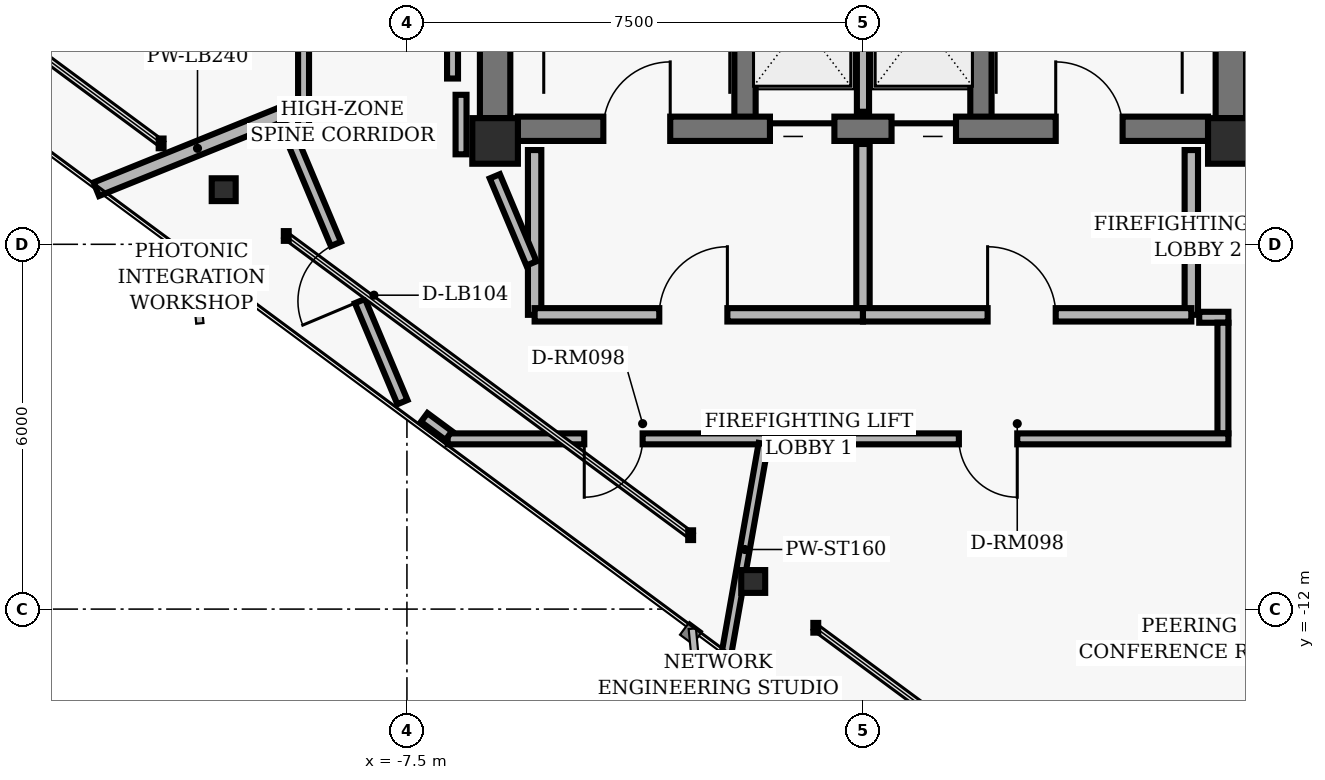
"""IFC4 building model, lengths in metres.
Left out: names, types, materials, properties, quantities, classifications, styles, units other than length and angle.
Written with IfcOpenShell. Run it as: python <this file> out.ifc"""

import sys

from ifc_helpers import new_model, si_unit, direction, frame, frame_2d, origin, origin_2d, place, context, subcontext, project, spatial, rectangle, hollow_rectangle, i_section, extrude, element, fill, save


model = new_model("IFC4")
c1 = context("Model", 3, precision=1e-05, world=origin(), true_north=direction((0.0, 1.0)))
c2 = subcontext(c1, "Body", "Model", "MODEL_VIEW")
j1 = project(units=[si_unit("LENGTHUNIT", "METRE"), si_unit("PLANEANGLEUNIT", "RADIAN")], contexts=[c1])
p1 = place(None, origin())
s1 = spatial("IfcSite", under=j1, at=p1, CompositionType="ELEMENT")
p2 = place(p1, origin())
s2 = spatial("IfcBuilding", under=s1, at=p2, CompositionType="ELEMENT")
p3 = place(p2, frame((0.0, 0.0, 217.92)))
s3 = spatial("IfcBuildingStorey", under=s2, at=p3, CompositionType="ELEMENT", Elevation=217.92)
for number, where, z_axis, x_axis in (
    (1, (-6.05, -4.3, 0.0), (0.0, 0.0, 1.0), (1.0, 0.0, 0.0)),
    (2, (6.05, -4.3, 0.0), (0.0, 0.0, 1.0), (1.0, 0.0, 0.0)),
):
    element("IfcColumn", number, at=place(p3, frame(where, z_axis=z_axis, x_axis=x_axis)), inside=s3, PredefinedType="COLUMN", context=c2, shape_type="SweptSolid", body=[
        extrude(hollow_rectangle(XDim=0.75, YDim=0.75, WallThickness=0.05, InnerFilletRadius=0.02, OuterFilletRadius=0.04, at=origin_2d()), origin(), (0.0, 0.0, 1.0), 3.04),
    ])
for number, where, z_axis, x_axis in (
    (3, (-6.05, -3.925, 0.0), (0.0, 0.0, 1.0), (0.0, 1.0, 0.0)),
    (4, (6.05, -3.925, 0.0), (0.0, 0.0, 1.0), (0.0, 1.0, 0.0)),
):
    element("IfcWall", number, at=place(p3, frame(where, z_axis=z_axis, x_axis=x_axis)), inside=s3, PredefinedType="SHEAR", context=c2, shape_type="SweptSolid", body=[
        extrude(rectangle(XDim=3.55, YDim=0.5, at=frame_2d((1.775, 0.0))), origin(), (0.0, 0.0, 1.0), 2.798),
    ])
for number, where, z_axis, x_axis in (
    (5, (-1.94, -4.1, 0.0), (0.0, 0.0, 1.0), (0.0, 1.0, 0.0)),
    (6, (1.94, -4.1, 0.0), (0.0, 0.0, 1.0), (0.0, 1.0, 0.0)),
):
    element("IfcWall", number, at=place(p3, frame(where, z_axis=z_axis, x_axis=x_axis)), inside=s3, PredefinedType="SHEAR", context=c2, shape_type="SweptSolid", body=[
        extrude(rectangle(XDim=8.2, YDim=0.35, at=frame_2d((4.1, 0.0))), origin(), (0.0, 0.0, 1.0), 2.798),
    ])
p4 = place(p3, frame((-5.675, -4.1, 0.0), z_axis=(0.0, 0.0, 1.0), x_axis=(1.0, 0.0, 0.0)))
e7 = element("IfcWall", 7, at=p4, inside=s3, PredefinedType="SHEAR", context=c2, shape_type="SweptSolid", body=[
    extrude(rectangle(XDim=11.35, YDim=0.4, at=frame_2d((5.675, 0.0))), origin(), (0.0, 0.0, 1.0), 2.798),
])
p5 = place(p4, frame((1.405, 0.0, 0.0)))
e8 = element("IfcOpeningElement", 8, at=p5, cuts=e7, PredefinedType="OPENING", context=c2, shape_type="SweptSolid", body=[
    extrude(rectangle(XDim=1.1, YDim=2.04, at=frame_2d((0.55, 1.02))), frame((0.0, 0.21, 0.0), z_axis=(0.0, -1.0, 0.0), x_axis=(1.0, 0.0, 0.0)), (0.0, 0.0, 1.0), 0.42),
])
p6 = place(p4, frame((8.845, 0.0, 0.0)))
e9 = element("IfcOpeningElement", 9, at=p6, cuts=e7, PredefinedType="OPENING", context=c2, shape_type="SweptSolid", body=[
    extrude(rectangle(XDim=1.1, YDim=2.04, at=frame_2d((0.55, 1.02))), frame((0.0, 0.21, 0.0), z_axis=(0.0, -1.0, 0.0), x_axis=(1.0, 0.0, 0.0)), (0.0, 0.0, 1.0), 0.42),
])
p7 = place(p4, frame((4.145, 0.0, 0.0)))
e10 = element("IfcOpeningElement", 10, at=p7, cuts=e7, PredefinedType="OPENING", context=c2, shape_type="SweptSolid", body=[
    extrude(rectangle(XDim=1.06, YDim=2.04, at=frame_2d((0.53, 1.02))), frame((0.0, 0.21, 0.0), z_axis=(0.0, -1.0, 0.0), x_axis=(1.0, 0.0, 0.0)), (0.0, 0.0, 1.0), 0.42),
])
p8 = place(p4, frame((6.145, 0.0, 0.0)))
e11 = element("IfcOpeningElement", 11, at=p8, cuts=e7, PredefinedType="OPENING", context=c2, shape_type="SweptSolid", body=[
    extrude(rectangle(XDim=1.06, YDim=2.04, at=frame_2d((0.53, 1.02))), frame((0.0, 0.21, 0.0), z_axis=(0.0, -1.0, 0.0), x_axis=(1.0, 0.0, 0.0)), (0.0, 0.0, 1.0), 0.42),
])
for number, where, z_axis, x_axis in (
    (12, (-10.513, -5.102, 0.0), (0.0, 0.0, 1.0), (1.0, 0.0, 0.0)),
    (13, (-1.805, -11.546, 0.0), (0.0, 0.0, 1.0), (1.0, 0.0, 0.0)),
):
    element("IfcColumn", number, at=place(p3, frame(where, z_axis=z_axis, x_axis=x_axis)), inside=s3, PredefinedType="COLUMN", context=c2, shape_type="SweptSolid", body=[
        extrude(i_section(OverallWidth=0.394, OverallDepth=0.375, WebThickness=0.017, FlangeThickness=0.028, FilletRadius=0.016, at=origin_2d()), origin(), (0.0, 0.0, 1.0), 3.04),
    ])
p9 = place(p3, frame((0.0, -3.82, 0.0), z_axis=(0.0, 0.0, 1.0), x_axis=(0.0, 1.0, 0.0)))
e14 = element("IfcWall", 14, at=p9, inside=s3, PredefinedType="PARTITIONING", context=c2, shape_type="SweptSolid", body=[
    extrude(rectangle(XDim=2.67, YDim=0.2, at=frame_2d((1.335, 0.0))), origin(), (0.0, 0.0, 1.0), 2.773),
])
for number, where, z_axis, x_axis in (
    (15, (-5.4, -7.16, 0.0), (0.0, 0.0, 1.0), (0.0, 1.0, 0.0)),
    (16, (5.4, -7.16, 0.0), (0.0, 0.0, 1.0), (0.0, 1.0, 0.0)),
):
    element("IfcWall", number, at=place(p3, frame(where, z_axis=z_axis, x_axis=x_axis)), inside=s3, PredefinedType="PARTITIONING", context=c2, shape_type="SweptSolid", body=[
        extrude(rectangle(XDim=2.71, YDim=0.22, at=frame_2d((1.355, 0.0))), origin(), (0.0, 0.0, 1.0), 2.773),
    ])
p10 = place(p3, frame((0.0, -7.16, 0.0), z_axis=(0.0, 0.0, 1.0), x_axis=(0.0, 1.0, 0.0)))
e17 = element("IfcWall", 17, at=p10, inside=s3, PredefinedType="PARTITIONING", context=c2, shape_type="SweptSolid", body=[
    extrude(rectangle(XDim=2.81, YDim=0.22, at=frame_2d((1.405, 0.0))), origin(), (0.0, 0.0, 1.0), 2.773),
])
p11 = place(p3, frame((-5.4, -7.16, 0.0), z_axis=(0.0, 0.0, 1.0), x_axis=(1.0, 0.0, 0.0)))
e18 = element("IfcWall", 18, at=p11, inside=s3, PredefinedType="PARTITIONING", context=c2, shape_type="SweptSolid", body=[
    extrude(rectangle(XDim=5.4, YDim=0.22, at=frame_2d((2.7, 0.0))), origin(), (0.0, 0.0, 1.0), 2.395),
])
p12 = place(p11, frame((2.05, 0.0, 0.0)))
e19 = element("IfcOpeningElement", 19, at=p12, cuts=e18, PredefinedType="OPENING", context=c2, shape_type="SweptSolid", body=[
    extrude(rectangle(XDim=1.12, YDim=2.02, at=frame_2d((0.56, 1.01))), frame((0.0, 0.12, 0.0), z_axis=(0.0, -1.0, 0.0), x_axis=(1.0, 0.0, 0.0)), (0.0, 0.0, 1.0), 0.24),
])
p13 = place(p3, frame((0.0, -7.16, 0.0), z_axis=(0.0, 0.0, 1.0), x_axis=(1.0, 0.0, 0.0)))
e20 = element("IfcWall", 20, at=p13, inside=s3, PredefinedType="PARTITIONING", context=c2, shape_type="SweptSolid", body=[
    extrude(rectangle(XDim=5.4, YDim=0.22, at=frame_2d((2.7, 0.0))), origin(), (0.0, 0.0, 1.0), 2.773),
])
p14 = place(p13, frame((2.05, 0.0, 0.0)))
e21 = element("IfcOpeningElement", 21, at=p14, cuts=e20, PredefinedType="OPENING", context=c2, shape_type="SweptSolid", body=[
    extrude(rectangle(XDim=1.12, YDim=2.02, at=frame_2d((0.56, 1.01))), frame((0.0, 0.12, 0.0), z_axis=(0.0, -1.0, 0.0), x_axis=(1.0, 0.0, 0.0)), (0.0, 0.0, 1.0), 0.24),
])
p15 = place(p3, frame((-7.574, -8.596, 0.0), z_axis=(0.0, 0.0, 1.0), x_axis=(-0.38757793583, 0.921836939842, 0.0)))
e22 = element("IfcWall", 22, at=p15, inside=s3, PredefinedType="PARTITIONING", context=c2, shape_type="SweptSolid", body=[
    extrude(rectangle(XDim=4.625, YDim=0.18, at=frame_2d((2.313, 0.0))), origin(), (0.0, 0.0, 1.0), 2.773),
])
p16 = place(p15, frame((1.803, 0.0, 0.0)))
e23 = element("IfcOpeningElement", 23, at=p16, cuts=e22, PredefinedType="OPENING", context=c2, shape_type="SweptSolid", body=[
    extrude(rectangle(XDim=1.02, YDim=2.02, at=frame_2d((0.51, 1.01))), frame((0.0, 0.1, 0.0), z_axis=(0.0, -1.0, 0.0), x_axis=(1.0, 0.0, 0.0)), (0.0, 0.0, 1.0), 0.2),
])
p17 = place(p3, frame((-9.2, -4.303, 0.0), z_axis=(0.0, 0.0, 1.0), x_axis=(0.0, 1.0, 0.0)))
e24 = element("IfcWall", 24, at=p17, inside=s3, PredefinedType="PARTITIONING", context=c2, shape_type="SweptSolid", body=[
    extrude(rectangle(XDim=8.607, YDim=0.18, at=frame_2d((4.303, 0.0))), origin(), (0.0, 0.0, 1.0), 2.773),
])
p18 = place(p17, frame((2.767, 0.0, 0.0)))
e25 = element("IfcOpeningElement", 25, at=p18, cuts=e24, PredefinedType="OPENING", context=c2, shape_type="SweptSolid", body=[
    extrude(rectangle(XDim=0.96, YDim=2.02, at=frame_2d((0.48, 1.01))), frame((0.0, 0.1, 0.0), z_axis=(0.0, -1.0, 0.0), x_axis=(1.0, 0.0, 0.0)), (0.0, 0.0, 1.0), 0.2),
])
p19 = place(p3, frame((-6.75, 3.273, 0.0), z_axis=(0.0, 0.0, 1.0), x_axis=(0.0, -1.0, 0.0)))
e26 = element("IfcWall", 26, at=p19, inside=s3, PredefinedType="PARTITIONING", context=c2, shape_type="SweptSolid", body=[
    extrude(rectangle(XDim=6.547, YDim=0.18, at=frame_2d((3.273, 0.0))), origin(), (0.0, 0.0, 1.0), 2.773),
])
p20 = place(p3, frame((-6.61, -3.541, 0.0), z_axis=(0.0, 0.0, 1.0), x_axis=(0.0, -1.0, 0.0)))
e27 = element("IfcWall", 27, at=p20, inside=s3, PredefinedType="PARTITIONING", context=c2, shape_type="SweptSolid", body=[
    extrude(rectangle(XDim=0.979, YDim=0.18, at=frame_2d((0.489, 0.0))), origin(), (0.0, 0.0, 1.0), 2.773),
])
p21 = place(p3, frame((-6.055, -4.882, 0.0), z_axis=(0.0, 0.0, 1.0), x_axis=(0.387579540458, -0.921836265189, 0.0)))
e28 = element("IfcWall", 28, at=p21, inside=s3, PredefinedType="PARTITIONING", context=c2, shape_type="SweptSolid", body=[
    extrude(rectangle(XDim=1.555, YDim=0.18, at=frame_2d((0.777, 0.0))), origin(), (0.0, 0.0, 1.0), 2.253),
])
p22 = place(p3, frame((5.53, -7.2, 0.0), z_axis=(0.0, 0.0, 1.0), x_axis=(1.0, 0.0, 0.0)))
e29 = element("IfcWall", 29, at=p22, inside=s3, PredefinedType="PARTITIONING", context=c2, shape_type="SweptSolid", body=[
    extrude(rectangle(XDim=0.48, YDim=0.18, at=frame_2d((0.24, 0.0))), origin(), (0.0, 0.0, 1.0), 2.773),
])
p23 = place(p3, frame((5.92, -7.29, 0.0), z_axis=(0.0, 0.0, 1.0), x_axis=(0.0, -1.0, 0.0)))
e30 = element("IfcWall", 30, at=p23, inside=s3, PredefinedType="PARTITIONING", context=c2, shape_type="SweptSolid", body=[
    extrude(rectangle(XDim=1.82, YDim=0.18, at=frame_2d((0.91, 0.0))), origin(), (0.0, 0.0, 1.0), 2.253),
])
p24 = place(p3, frame((6.01, -9.2, 0.0), z_axis=(0.0, 0.0, 1.0), x_axis=(-1.0, 0.0, 0.0)))
e31 = element("IfcWall", 31, at=p24, inside=s3, PredefinedType="PARTITIONING", context=c2, shape_type="SweptSolid", body=[
    extrude(rectangle(XDim=12.84, YDim=0.18, at=frame_2d((6.42, 0.0))), origin(), (0.0, 0.0, 1.0), 2.773),
])
p25 = place(p24, frame((9.634, 0.0, 0.0)))
e32 = element("IfcOpeningElement", 32, at=p25, cuts=e31, PredefinedType="OPENING", context=c2, shape_type="SweptSolid", body=[
    extrude(rectangle(XDim=0.96, YDim=2.02, at=frame_2d((0.48, 1.01))), frame((0.0, 0.1, 0.0), z_axis=(0.0, -1.0, 0.0), x_axis=(1.0, 0.0, 0.0)), (0.0, 0.0, 1.0), 0.2),
])
p26 = place(p24, frame((3.473, 0.0, 0.0)))
e33 = element("IfcOpeningElement", 33, at=p26, cuts=e31, PredefinedType="OPENING", context=c2, shape_type="SweptSolid", body=[
    extrude(rectangle(XDim=0.96, YDim=2.02, at=frame_2d((0.48, 1.01))), frame((0.0, 0.1, 0.0), z_axis=(0.0, -1.0, 0.0), x_axis=(1.0, 0.0, 0.0)), (0.0, 0.0, 1.0), 0.2),
])
p27 = place(p3, frame((-6.812, -9.146, 0.0), z_axis=(0.0, 0.0, 1.0), x_axis=(-0.803893055119, 0.594773869577, 0.0)))
e34 = element("IfcWall", 34, at=p27, inside=s3, PredefinedType="PARTITIONING", context=c2, shape_type="SweptSolid", body=[
    extrude(rectangle(XDim=0.502, YDim=0.18, at=frame_2d((0.251, 0.0))), origin(), (0.0, 0.0, 1.0), 2.773),
])
p28 = place(p3, frame((-9.28, -3.75, 0.0), z_axis=(0.0, 0.0, 1.0), x_axis=(-0.927209590074, -0.374542889499, 0.0)))
e35 = element("IfcWall", 35, at=p28, inside=s3, PredefinedType="PARTITIONING", context=c2, shape_type="SweptSolid", body=[
    extrude(rectangle(XDim=3.59, YDim=0.24, at=frame_2d((1.795, 0.0))), origin(), (0.0, 0.0, 1.0), 2.773),
])
p29 = place(p3, frame((-1.636, -9.28, 0.0), z_axis=(0.0, 0.0, 1.0), x_axis=(-0.17367100135, -0.984803728308, 0.0)))
e36 = element("IfcWall", 36, at=p29, inside=s3, PredefinedType="PARTITIONING", context=c2, shape_type="SweptSolid", body=[
    extrude(rectangle(XDim=3.533, YDim=0.16, at=frame_2d((1.766, 0.0))), origin(), (0.0, 0.0, 1.0), 2.773),
])
p30 = place(p5, origin())
e37 = element("IfcDoor", 37, at=p30, inside=s3, OperationType="SINGLE_SWING_RIGHT", PredefinedType="DOOR", context=c2, shape_type="SweptSolid", body=[
    extrude(rectangle(XDim=1.1, YDim=2.04, at=frame_2d((0.55, 1.02))), frame((0.0, 0.025, 0.0), z_axis=(0.0, -1.0, 0.0), x_axis=(1.0, 0.0, 0.0)), (0.0, 0.0, 1.0), 0.05),
])
fill(e8, e37)
p31 = place(p6, origin())
e38 = element("IfcDoor", 38, at=p31, inside=s3, OperationType="SINGLE_SWING_LEFT", PredefinedType="DOOR", context=c2, shape_type="SweptSolid", body=[
    extrude(rectangle(XDim=1.1, YDim=2.04, at=frame_2d((0.55, 1.02))), frame((0.0, 0.025, 0.0), z_axis=(0.0, -1.0, 0.0), x_axis=(1.0, 0.0, 0.0)), (0.0, 0.0, 1.0), 0.05),
])
fill(e9, e38)
p32 = place(p7, origin())
e39 = element("IfcDoor", 39, at=p32, inside=s3, OperationType="SLIDING_TO_LEFT", PredefinedType="DOOR", context=c2, shape_type="SweptSolid", body=[
    extrude(rectangle(XDim=1.06, YDim=2.04, at=frame_2d((0.53, 1.02))), frame((0.0, 0.025, 0.0), z_axis=(0.0, -1.0, 0.0), x_axis=(1.0, 0.0, 0.0)), (0.0, 0.0, 1.0), 0.05),
])
fill(e10, e39)
p33 = place(p8, origin())
e40 = element("IfcDoor", 40, at=p33, inside=s3, OperationType="SLIDING_TO_RIGHT", PredefinedType="DOOR", context=c2, shape_type="SweptSolid", body=[
    extrude(rectangle(XDim=1.06, YDim=2.04, at=frame_2d((0.53, 1.02))), frame((0.0, 0.025, 0.0), z_axis=(0.0, -1.0, 0.0), x_axis=(1.0, 0.0, 0.0)), (0.0, 0.0, 1.0), 0.05),
])
fill(e11, e40)
p34 = place(p12, origin())
e41 = element("IfcDoor", 41, at=p34, inside=s3, OperationType="SINGLE_SWING_RIGHT", PredefinedType="DOOR", context=c2, shape_type="SweptSolid", body=[
    extrude(rectangle(XDim=1.12, YDim=2.02, at=frame_2d((0.56, 1.01))), frame((0.0, 0.025, 0.0), z_axis=(0.0, -1.0, 0.0), x_axis=(1.0, 0.0, 0.0)), (0.0, 0.0, 1.0), 0.05),
])
fill(e19, e41)
p35 = place(p14, origin())
e42 = element("IfcDoor", 42, at=p35, inside=s3, OperationType="SINGLE_SWING_LEFT", PredefinedType="DOOR", context=c2, shape_type="SweptSolid", body=[
    extrude(rectangle(XDim=1.12, YDim=2.02, at=frame_2d((0.56, 1.01))), frame((0.0, 0.025, 0.0), z_axis=(0.0, -1.0, 0.0), x_axis=(1.0, 0.0, 0.0)), (0.0, 0.0, 1.0), 0.05),
])
fill(e21, e42)
p36 = place(p16, origin())
e43 = element("IfcDoor", 43, at=p36, inside=s3, OperationType="SINGLE_SWING_LEFT", PredefinedType="DOOR", context=c2, shape_type="SweptSolid", body=[
    extrude(rectangle(XDim=1.02, YDim=2.02, at=frame_2d((0.51, 1.01))), frame((0.0, 0.025, 0.0), z_axis=(0.0, -1.0, 0.0), x_axis=(1.0, 0.0, 0.0)), (0.0, 0.0, 1.0), 0.05),
])
fill(e23, e43)
p37 = place(p25, origin())
e44 = element("IfcDoor", 44, at=p37, inside=s3, OperationType="SINGLE_SWING_RIGHT", PredefinedType="DOOR", context=c2, shape_type="SweptSolid", body=[
    extrude(rectangle(XDim=0.96, YDim=2.02, at=frame_2d((0.48, 1.01))), frame((0.0, 0.025, 0.0), z_axis=(0.0, -1.0, 0.0), x_axis=(1.0, 0.0, 0.0)), (0.0, 0.0, 1.0), 0.05),
])
fill(e32, e44)
p38 = place(p26, origin())
e45 = element("IfcDoor", 45, at=p38, inside=s3, OperationType="SINGLE_SWING_LEFT", PredefinedType="DOOR", context=c2, shape_type="SweptSolid", body=[
    extrude(rectangle(XDim=0.96, YDim=2.02, at=frame_2d((0.48, 1.01))), frame((0.0, 0.025, 0.0), z_axis=(0.0, -1.0, 0.0), x_axis=(1.0, 0.0, 0.0)), (0.0, 0.0, 1.0), 0.05),
])
fill(e33, e45)
save(model, sys.argv[1])
